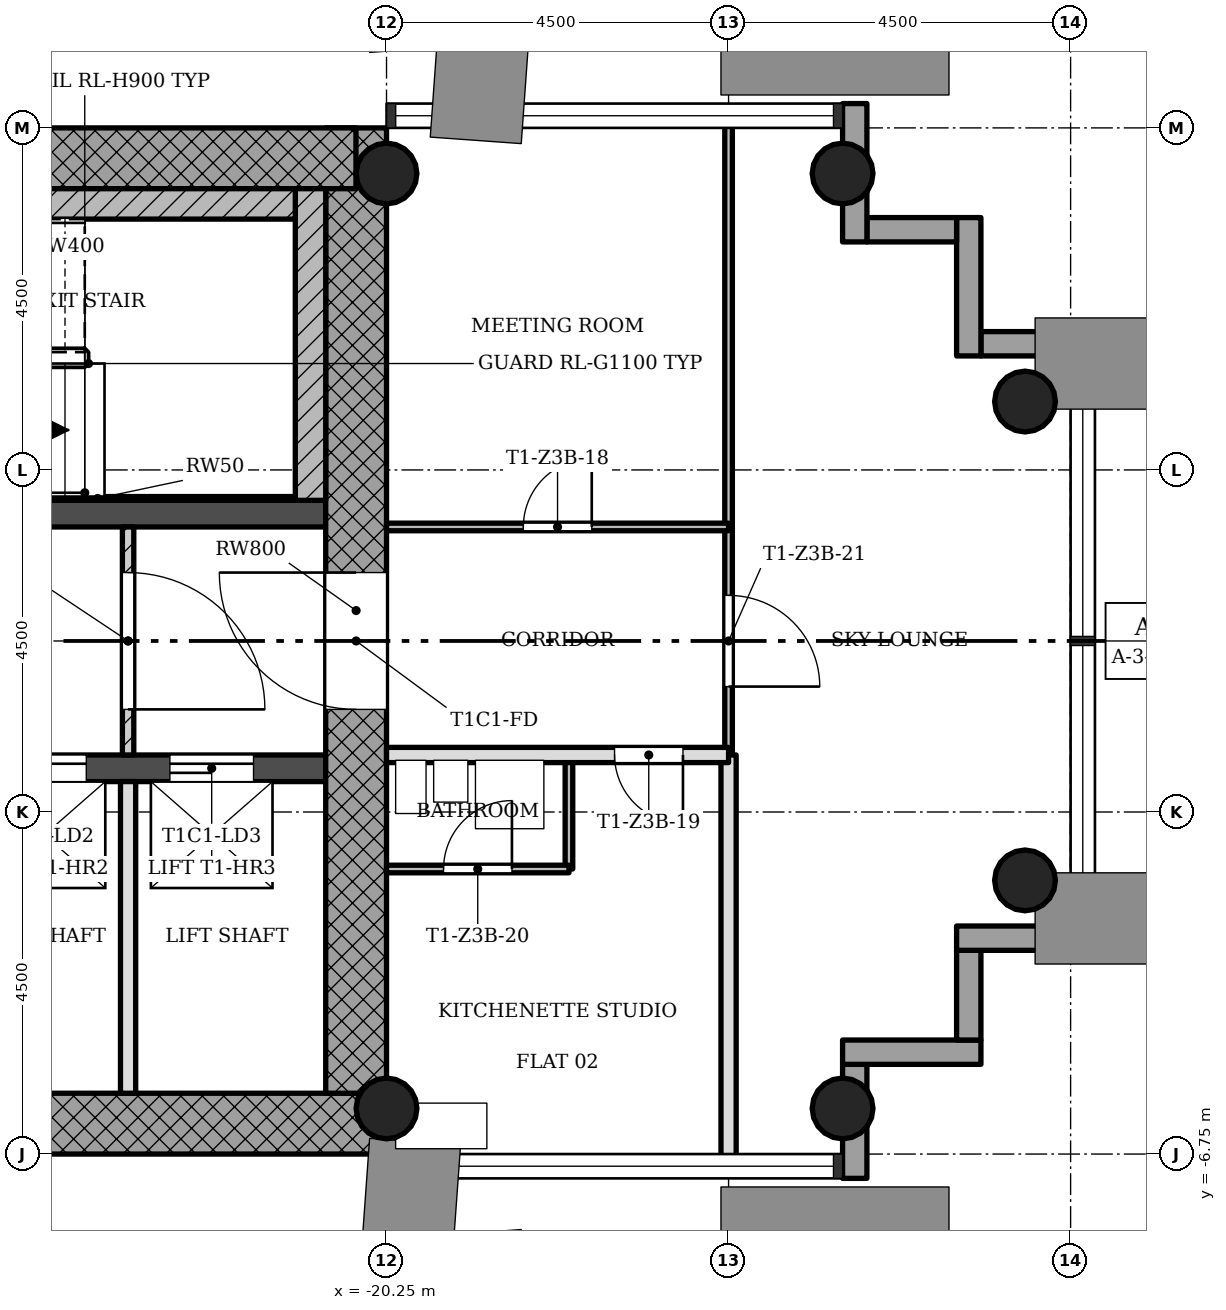
"""IFC4 building model, lengths in metres.
Left out: names, types, materials, properties, quantities, classifications, styles, units other than length and angle.
Written with IfcOpenShell. Run it as: python <this file> out.ifc"""

import sys

from ifc_helpers import new_model, si_unit, direction, frame, frame_2d, origin, origin_2d, place, context, subcontext, project, spatial, rectangle, hollow_circle, extrude, element, fill, save


model = new_model("IFC4")
c1 = context("Model", 3, precision=1e-05, world=origin(), true_north=direction((0.0, 1.0)))
c2 = subcontext(c1, "Body", "Model", "MODEL_VIEW")
j1 = project(units=[si_unit("LENGTHUNIT", "METRE"), si_unit("PLANEANGLEUNIT", "RADIAN")], contexts=[c1])
p1 = place(None, origin())
s1 = spatial("IfcSite", under=j1, at=p1, CompositionType="ELEMENT")
p2 = place(p1, origin())
s2 = spatial("IfcBuilding", under=s1, at=p2, CompositionType="ELEMENT")
p3 = place(p2, frame((0.0, 0.0, 150.7)))
s3 = spatial("IfcBuildingStorey", under=s2, at=p3, CompositionType="ELEMENT", Elevation=150.7)
p4 = place(p3, frame((-28.45, -6.35, 0.0), z_axis=(0.0, 0.0, 1.0), x_axis=(1.0, 0.0, 0.0)))
e1 = element("IfcWall", 1, at=p4, inside=s3, PredefinedType="SHEAR", context=c2, shape_type="SweptSolid", body=[
    extrude(rectangle(XDim=8.2, YDim=0.8, at=frame_2d((4.1, 0.0))), origin(), (0.0, 0.0, 1.0), 3.4),
])
p5 = place(p3, frame((-20.65, -5.95, 0.0), z_axis=(0.0, 0.0, 1.0), x_axis=(0.0, 1.0, 0.0)))
e2 = element("IfcWall", 2, at=p5, inside=s3, PredefinedType="SHEAR", context=c2, shape_type="SweptSolid", body=[
    extrude(rectangle(XDim=12.7, YDim=0.8, at=frame_2d((6.35, 0.0))), origin(), (0.0, 0.0, 1.0), 3.4),
])
p6 = place(p5, frame((5.05, 0.0, 0.0)))
e3 = element("IfcOpeningElement", 3, at=p6, cuts=e2, PredefinedType="OPENING", context=c2, shape_type="SweptSolid", body=[
    extrude(rectangle(XDim=1.8, YDim=2.1, at=frame_2d((0.9, 1.05))), frame((0.0, 0.41, 0.0), z_axis=(0.0, -1.0, 0.0), x_axis=(1.0, 0.0, 0.0)), (0.0, 0.0, 1.0), 0.82),
])
p7 = place(p3, frame((-20.652, 6.35, 0.0), z_axis=(0.0, 0.0, 1.0), x_axis=(-1.0, 0.0, 0.0)))
e4 = element("IfcWall", 4, at=p7, inside=s3, PredefinedType="SHEAR", context=c2, shape_type="SweptSolid", body=[
    extrude(rectangle(XDim=8.796, YDim=0.8, at=frame_2d((4.398, 0.0))), origin(), (0.0, 0.0, 1.0), 3.4),
])
p8 = place(p3, frame((-28.45, -1.675, 0.0), z_axis=(0.0, 0.0, 1.0), x_axis=(1.0, 0.0, 0.0)))
e5 = element("IfcWall", 5, at=p8, inside=s3, PredefinedType="SHEAR", context=c2, shape_type="SweptSolid", body=[
    extrude(rectangle(XDim=7.4, YDim=0.35, at=frame_2d((3.7, 0.0))), origin(), (0.0, 0.0, 1.0), 3.4),
])
p9 = place(p8, frame((0.95, 0.0, 0.0)))
e6 = element("IfcOpeningElement", 6, at=p9, cuts=e5, PredefinedType="OPENING", context=c2, shape_type="SweptSolid", body=[
    extrude(rectangle(XDim=1.1, YDim=2.1, at=frame_2d((0.55, 1.05))), frame((0.0, 0.185, 0.0), z_axis=(0.0, -1.0, 0.0), x_axis=(1.0, 0.0, 0.0)), (0.0, 0.0, 1.0), 0.37),
])
p10 = place(p8, frame((3.15, 0.0, 0.0)))
e7 = element("IfcOpeningElement", 7, at=p10, cuts=e5, PredefinedType="OPENING", context=c2, shape_type="SweptSolid", body=[
    extrude(rectangle(XDim=1.1, YDim=2.1, at=frame_2d((0.55, 1.05))), frame((0.0, 0.185, 0.0), z_axis=(0.0, -1.0, 0.0), x_axis=(1.0, 0.0, 0.0)), (0.0, 0.0, 1.0), 0.37),
])
p11 = place(p8, frame((5.35, 0.0, 0.0)))
e8 = element("IfcOpeningElement", 8, at=p11, cuts=e5, PredefinedType="OPENING", context=c2, shape_type="SweptSolid", body=[
    extrude(rectangle(XDim=1.1, YDim=2.1, at=frame_2d((0.55, 1.05))), frame((0.0, 0.185, 0.0), z_axis=(0.0, -1.0, 0.0), x_axis=(1.0, 0.0, 0.0)), (0.0, 0.0, 1.0), 0.37),
])
p12 = place(p3, frame((-28.45, 1.675, 0.0), z_axis=(0.0, 0.0, 1.0), x_axis=(1.0, 0.0, 0.0)))
e9 = element("IfcWall", 9, at=p12, inside=s3, PredefinedType="SHEAR", context=c2, shape_type="SweptSolid", body=[
    extrude(rectangle(XDim=7.4, YDim=0.35, at=frame_2d((3.7, 0.0))), origin(), (0.0, 0.0, 1.0), 3.4),
])
p13 = place(p12, frame((0.85, 0.0, 0.0)))
e10 = element("IfcOpeningElement", 10, at=p13, cuts=e9, PredefinedType="OPENING", context=c2, shape_type="SweptSolid", body=[
    extrude(rectangle(XDim=0.9, YDim=2.1, at=frame_2d((0.45, 1.05))), frame((0.0, 0.185, 0.0), z_axis=(0.0, -1.0, 0.0), x_axis=(1.0, 0.0, 0.0)), (0.0, 0.0, 1.0), 0.37),
])
for number, where, z_axis, x_axis in (
    (11, (-20.25, -6.15, 0.0), (0.0, 0.0, 1.0), (1.0, 0.0, 0.0)),
    (12, (-20.25, 6.15, 0.0), (0.0, 0.0, 1.0), (1.0, 0.0, 0.0)),
    (13, (-14.25, -6.15, 0.0), (0.0, 0.0, 1.0), (1.0, 0.0, 0.0)),
    (14, (-14.25, 6.15, 0.0), (0.0, 0.0, 1.0), (1.0, 0.0, 0.0)),
    (15, (-11.85, -3.15, 0.0), (0.0, 0.0, 1.0), (1.0, 0.0, 0.0)),
    (16, (-11.85, 3.15, 0.0), (0.0, 0.0, 1.0), (1.0, 0.0, 0.0)),
):
    element("IfcColumn", number, at=place(p3, frame(where, z_axis=z_axis, x_axis=x_axis)), inside=s3, PredefinedType="COLUMN", context=c2, shape_type="SweptSolid", body=[
        extrude(hollow_circle(Radius=0.4, WallThickness=0.028, at=origin_2d()), origin(), (0.0, 0.0, 1.0), 3.4),
    ])
p14 = place(p3, frame((-14.09, -7.07, -0.3), z_axis=(0.0, 0.0, 1.0), x_axis=(0.0, 1.0, 0.0)))
e17 = element("IfcWall", 17, at=p14, inside=s3, PredefinedType="STANDARD", context=c2, shape_type="SweptSolid", body=[
    extrude(rectangle(XDim=1.5, YDim=0.32, at=frame_2d((0.75, 0.0))), origin(), (0.0, 0.0, 1.0), 3.4),
])
p15 = place(p3, frame((-14.25, -5.41, -0.3), z_axis=(0.0, 0.0, 1.0), x_axis=(1.0, 0.0, 0.0)))
e18 = element("IfcWall", 18, at=p15, inside=s3, PredefinedType="STANDARD", context=c2, shape_type="SweptSolid", body=[
    extrude(rectangle(XDim=1.82, YDim=0.32, at=frame_2d((0.91, 0.0))), origin(), (0.0, 0.0, 1.0), 3.4),
])
p16 = place(p3, frame((-12.59, -5.25, -0.3), z_axis=(0.0, 0.0, 1.0), x_axis=(0.0, 1.0, 0.0)))
e19 = element("IfcWall", 19, at=p16, inside=s3, PredefinedType="STANDARD", context=c2, shape_type="SweptSolid", body=[
    extrude(rectangle(XDim=1.18, YDim=0.32, at=frame_2d((0.59, 0.0))), origin(), (0.0, 0.0, 1.0), 3.4),
])
p17 = place(p3, frame((-12.75, -3.91, -0.3), z_axis=(0.0, 0.0, 1.0), x_axis=(1.0, 0.0, 0.0)))
e20 = element("IfcWall", 20, at=p17, inside=s3, PredefinedType="STANDARD", context=c2, shape_type="SweptSolid", body=[
    extrude(rectangle(XDim=1.82, YDim=0.32, at=frame_2d((0.91, 0.0))), origin(), (0.0, 0.0, 1.0), 3.4),
])
p18 = place(p3, frame((-10.93, 3.91, -0.3), z_axis=(0.0, 0.0, 1.0), x_axis=(-1.0, 0.0, 0.0)))
e21 = element("IfcWall", 21, at=p18, inside=s3, PredefinedType="STANDARD", context=c2, shape_type="SweptSolid", body=[
    extrude(rectangle(XDim=1.5, YDim=0.32, at=frame_2d((0.75, 0.0))), origin(), (0.0, 0.0, 1.0), 3.4),
])
p19 = place(p3, frame((-12.59, 3.75, -0.3), z_axis=(0.0, 0.0, 1.0), x_axis=(0.0, 1.0, 0.0)))
e22 = element("IfcWall", 22, at=p19, inside=s3, PredefinedType="STANDARD", context=c2, shape_type="SweptSolid", body=[
    extrude(rectangle(XDim=1.82, YDim=0.32, at=frame_2d((0.91, 0.0))), origin(), (0.0, 0.0, 1.0), 3.4),
])
p20 = place(p3, frame((-12.75, 5.41, -0.3), z_axis=(0.0, 0.0, 1.0), x_axis=(-1.0, 0.0, 0.0)))
e23 = element("IfcWall", 23, at=p20, inside=s3, PredefinedType="STANDARD", context=c2, shape_type="SweptSolid", body=[
    extrude(rectangle(XDim=1.18, YDim=0.32, at=frame_2d((0.59, 0.0))), origin(), (0.0, 0.0, 1.0), 3.4),
])
p21 = place(p3, frame((-14.09, 5.25, -0.3), z_axis=(0.0, 0.0, 1.0), x_axis=(0.0, 1.0, 0.0)))
e24 = element("IfcWall", 24, at=p21, inside=s3, PredefinedType="STANDARD", context=c2, shape_type="SweptSolid", body=[
    extrude(rectangle(XDim=1.82, YDim=0.32, at=frame_2d((0.91, 0.0))), origin(), (0.0, 0.0, 1.0), 3.4),
])
p22 = place(p3, frame((-23.65, -1.5, 0.0), z_axis=(0.0, 0.0, 1.0), x_axis=(0.0, 1.0, 0.0)))
e25 = element("IfcWall", 25, at=p22, inside=s3, PredefinedType="PARTITIONING", context=c2, shape_type="SweptSolid", body=[
    extrude(rectangle(XDim=3.0, YDim=0.15, at=frame_2d((1.5, 0.0))), origin(), (0.0, 0.0, 1.0), 3.0),
])
p23 = place(p22, frame((0.6, 0.0, 0.0)))
e26 = element("IfcOpeningElement", 26, at=p23, cuts=e25, PredefinedType="OPENING", context=c2, shape_type="SweptSolid", body=[
    extrude(rectangle(XDim=1.8, YDim=2.1, at=frame_2d((0.9, 1.05))), frame((0.0, 0.085, 0.0), z_axis=(0.0, -1.0, 0.0), x_axis=(1.0, 0.0, 0.0)), (0.0, 0.0, 1.0), 0.17),
])
p24 = place(p3, frame((-23.65, -5.95, 0.0), z_axis=(0.0, 0.0, 1.0), x_axis=(0.0, 1.0, 0.0)))
e27 = element("IfcWall", 27, at=p24, inside=s3, PredefinedType="SOLIDWALL", context=c2, shape_type="SweptSolid", body=[
    extrude(rectangle(XDim=4.1, YDim=0.2, at=frame_2d((2.05, 0.0))), origin(), (0.0, 0.0, 1.0), 3.0),
])
p25 = place(p3, frame((-17.85, -3.0, 0.0), z_axis=(0.0, 0.0, 1.0), x_axis=(0.0, 1.0, 0.0)))
e28 = element("IfcWall", 28, at=p25, inside=s3, PredefinedType="PARTITIONING", context=c2, shape_type="SweptSolid", body=[
    extrude(rectangle(XDim=1.5, YDim=0.1, at=frame_2d((0.75, 0.0))), origin(), (0.0, 0.0, 1.0), 3.0),
])
p26 = place(p3, frame((-15.75, -1.5, 0.0), z_axis=(0.0, 0.0, 1.0), x_axis=(0.0, 1.0, 0.0)))
e29 = element("IfcWall", 29, at=p26, inside=s3, PredefinedType="PARTITIONING", context=c2, shape_type="SweptSolid", body=[
    extrude(rectangle(XDim=8.35, YDim=0.1, at=frame_2d((4.175, 0.0))), origin(), (0.0, 0.0, 1.0), 3.0),
])
p27 = place(p26, frame((0.9, 0.0, 0.0)))
e30 = element("IfcOpeningElement", 30, at=p27, cuts=e29, PredefinedType="OPENING", context=c2, shape_type="SweptSolid", body=[
    extrude(rectangle(XDim=1.2, YDim=2.1, at=frame_2d((0.6, 1.05))), frame((0.0, 0.06, 0.0), z_axis=(0.0, -1.0, 0.0), x_axis=(1.0, 0.0, 0.0)), (0.0, 0.0, 1.0), 0.12),
])
p28 = place(p3, frame((-15.75, -6.85, 0.0), z_axis=(0.0, 0.0, 1.0), x_axis=(0.0, 1.0, 0.0)))
e31 = element("IfcWall", 31, at=p28, inside=s3, PredefinedType="SOLIDWALL", context=c2, shape_type="SweptSolid", body=[
    extrude(rectangle(XDim=5.35, YDim=0.2, at=frame_2d((2.675, 0.0))), origin(), (0.0, 0.0, 1.0), 3.0),
])
p29 = place(p3, frame((-20.25, -3.0, 0.0), z_axis=(0.0, 0.0, 1.0), x_axis=(1.0, 0.0, 0.0)))
e32 = element("IfcWall", 32, at=p29, inside=s3, PredefinedType="PARTITIONING", context=c2, shape_type="SweptSolid", body=[
    extrude(rectangle(XDim=2.4, YDim=0.1, at=frame_2d((1.2, 0.0))), origin(), (0.0, 0.0, 1.0), 3.0),
])
p30 = place(p29, frame((0.75, 0.0, 0.0)))
e33 = element("IfcOpeningElement", 33, at=p30, cuts=e32, PredefinedType="OPENING", context=c2, shape_type="SweptSolid", body=[
    extrude(rectangle(XDim=0.9, YDim=2.1, at=frame_2d((0.45, 1.05))), frame((0.0, 0.06, 0.0), z_axis=(0.0, -1.0, 0.0), x_axis=(1.0, 0.0, 0.0)), (0.0, 0.0, 1.0), 0.12),
])
p31 = place(p3, frame((-20.25, -1.5, 0.0), z_axis=(0.0, 0.0, 1.0), x_axis=(1.0, 0.0, 0.0)))
e34 = element("IfcWall", 34, at=p31, inside=s3, PredefinedType="SOLIDWALL", context=c2, shape_type="SweptSolid", body=[
    extrude(rectangle(XDim=4.5, YDim=0.2, at=frame_2d((2.25, 0.0))), origin(), (0.0, 0.0, 1.0), 3.0),
])
p32 = place(p31, frame((3.0, 0.0, 0.0)))
e35 = element("IfcOpeningElement", 35, at=p32, cuts=e34, PredefinedType="OPENING", context=c2, shape_type="SweptSolid", body=[
    extrude(rectangle(XDim=0.9, YDim=2.1, at=frame_2d((0.45, 1.05))), frame((0.0, 0.11, 0.0), z_axis=(0.0, -1.0, 0.0), x_axis=(1.0, 0.0, 0.0)), (0.0, 0.0, 1.0), 0.22),
])
p33 = place(p3, frame((-20.25, 1.5, 0.0), z_axis=(0.0, 0.0, 1.0), x_axis=(1.0, 0.0, 0.0)))
e36 = element("IfcWall", 36, at=p33, inside=s3, PredefinedType="PARTITIONING", context=c2, shape_type="SweptSolid", body=[
    extrude(rectangle(XDim=4.5, YDim=0.1, at=frame_2d((2.25, 0.0))), origin(), (0.0, 0.0, 1.0), 3.0),
])
p34 = place(p33, frame((1.8, 0.0, 0.0)))
e37 = element("IfcOpeningElement", 37, at=p34, cuts=e36, PredefinedType="OPENING", context=c2, shape_type="SweptSolid", body=[
    extrude(rectangle(XDim=0.9, YDim=2.1, at=frame_2d((0.45, 1.05))), frame((0.0, 0.06, 0.0), z_axis=(0.0, -1.0, 0.0), x_axis=(1.0, 0.0, 0.0)), (0.0, 0.0, 1.0), 0.12),
])
p35 = place(p3, frame((-21.25, 1.85, 0.0), z_axis=(0.0, 0.0, 1.0), x_axis=(0.0, 1.0, 0.0)))
e38 = element("IfcWall", 38, at=p35, inside=s3, PredefinedType="SHEAR", context=c2, shape_type="SweptSolid", body=[
    extrude(rectangle(XDim=4.1, YDim=0.4, at=frame_2d((2.05, 0.0))), origin(), (0.0, 0.0, 1.0), 3.4),
])
p36 = place(p3, frame((-28.05, 5.75, 0.0), z_axis=(0.0, 0.0, 1.0), x_axis=(1.0, 0.0, 0.0)))
e39 = element("IfcWall", 39, at=p36, inside=s3, PredefinedType="SHEAR", context=c2, shape_type="SweptSolid", body=[
    extrude(rectangle(XDim=6.6, YDim=0.4, at=frame_2d((3.3, 0.0))), origin(), (0.0, 0.0, 1.0), 3.4),
])
p37 = place(p3, frame((-26.65, 1.875, 0.0), z_axis=(0.0, 0.0, 1.0), x_axis=(1.0, 0.0, 0.0)))
e40 = element("IfcWall", 40, at=p37, inside=s3, PredefinedType="SHEAR", context=c2, shape_type="SweptSolid", body=[
    extrude(rectangle(XDim=5.2, YDim=0.05, at=frame_2d((2.6, 0.0))), origin(), (0.0, 0.0, 1.0), 3.4),
])
p38 = place(p23, origin())
e41 = element("IfcDoor", 41, at=p38, inside=s3, OperationType="SINGLE_SWING_LEFT", PredefinedType="DOOR", context=c2, shape_type="SweptSolid", body=[
    extrude(rectangle(XDim=1.8, YDim=2.1, at=frame_2d((0.9, 1.05))), frame((0.0, 0.025, 0.0), z_axis=(0.0, -1.0, 0.0), x_axis=(1.0, 0.0, 0.0)), (0.0, 0.0, 1.0), 0.05),
])
fill(e26, e41)
p39 = place(p34, origin())
e42 = element("IfcDoor", 42, at=p39, inside=s3, OperationType="SINGLE_SWING_LEFT", PredefinedType="DOOR", context=c2, shape_type="SweptSolid", body=[
    extrude(rectangle(XDim=0.9, YDim=2.1, at=frame_2d((0.45, 1.05))), frame((0.0, 0.025, 0.0), z_axis=(0.0, -1.0, 0.0), x_axis=(1.0, 0.0, 0.0)), (0.0, 0.0, 1.0), 0.05),
])
fill(e37, e42)
p40 = place(p32, origin())
e43 = element("IfcDoor", 43, at=p40, inside=s3, OperationType="SINGLE_SWING_RIGHT", PredefinedType="DOOR", context=c2, shape_type="SweptSolid", body=[
    extrude(rectangle(XDim=0.9, YDim=2.1, at=frame_2d((0.45, 1.05))), frame((0.0, 0.025, 0.0), z_axis=(0.0, -1.0, 0.0), x_axis=(1.0, 0.0, 0.0)), (0.0, 0.0, 1.0), 0.05),
])
fill(e35, e43)
p41 = place(p30, origin())
e44 = element("IfcDoor", 44, at=p41, inside=s3, OperationType="SINGLE_SWING_LEFT", PredefinedType="DOOR", context=c2, shape_type="SweptSolid", body=[
    extrude(rectangle(XDim=0.9, YDim=2.1, at=frame_2d((0.45, 1.05))), frame((0.0, 0.025, 0.0), z_axis=(0.0, -1.0, 0.0), x_axis=(1.0, 0.0, 0.0)), (0.0, 0.0, 1.0), 0.05),
])
fill(e33, e44)
p42 = place(p27, origin())
e45 = element("IfcDoor", 45, at=p42, inside=s3, OperationType="SINGLE_SWING_LEFT", PredefinedType="DOOR", context=c2, shape_type="SweptSolid", body=[
    extrude(rectangle(XDim=1.2, YDim=2.1, at=frame_2d((0.6, 1.05))), frame((0.0, 0.025, 0.0), z_axis=(0.0, -1.0, 0.0), x_axis=(1.0, 0.0, 0.0)), (0.0, 0.0, 1.0), 0.05),
])
fill(e30, e45)
p43 = place(p10, origin())
e46 = element("IfcDoor", 46, at=p43, inside=s3, OperationType="SLIDING_TO_LEFT", PredefinedType="DOOR", context=c2, shape_type="SweptSolid", body=[
    extrude(rectangle(XDim=1.1, YDim=2.1, at=frame_2d((0.55, 1.05))), frame((0.0, 0.025, 0.0), z_axis=(0.0, -1.0, 0.0), x_axis=(1.0, 0.0, 0.0)), (0.0, 0.0, 1.0), 0.05),
])
fill(e7, e46)
p44 = place(p11, origin())
e47 = element("IfcDoor", 47, at=p44, inside=s3, OperationType="SLIDING_TO_LEFT", PredefinedType="DOOR", context=c2, shape_type="SweptSolid", body=[
    extrude(rectangle(XDim=1.1, YDim=2.1, at=frame_2d((0.55, 1.05))), frame((0.0, 0.025, 0.0), z_axis=(0.0, -1.0, 0.0), x_axis=(1.0, 0.0, 0.0)), (0.0, 0.0, 1.0), 0.05),
])
fill(e8, e47)
p45 = place(p6, origin())
e48 = element("IfcDoor", 48, at=p45, inside=s3, OperationType="SINGLE_SWING_LEFT", PredefinedType="DOOR", context=c2, shape_type="SweptSolid", body=[
    extrude(rectangle(XDim=1.8, YDim=2.1, at=frame_2d((0.9, 1.05))), frame((0.0, 0.025, 0.0), z_axis=(0.0, -1.0, 0.0), x_axis=(1.0, 0.0, 0.0)), (0.0, 0.0, 1.0), 0.05),
])
fill(e3, e48)
save(model, sys.argv[1])
